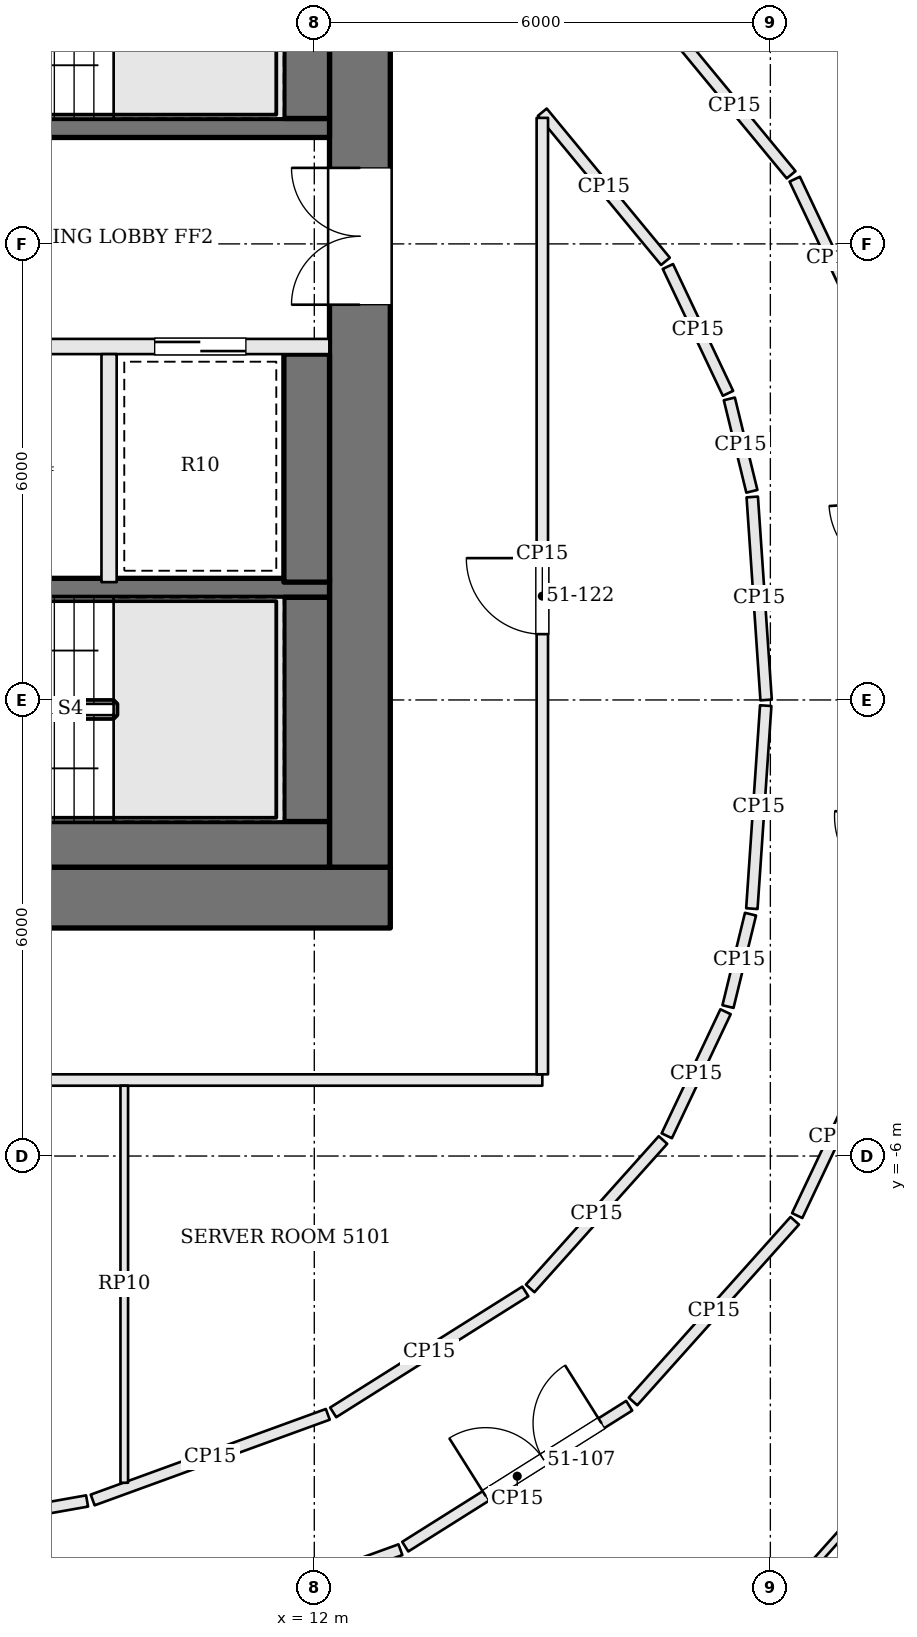
"""IFC4 building model, lengths in metres.
Left out: names, types, materials, properties, quantities, classifications, styles, units other than length and angle.
Written with IfcOpenShell. Run it as: python <this file> out.ifc"""

import sys

from ifc_helpers import new_model, si_unit, direction, frame, frame_2d, origin, place, context, subcontext, project, spatial, rectangle, extrude, element, fill, save


model = new_model("IFC4")
c1 = context("Model", 3, precision=1e-05, world=origin(), true_north=direction((0.0, 1.0)))
c2 = subcontext(c1, "Body", "Model", "MODEL_VIEW")
j1 = project(units=[si_unit("LENGTHUNIT", "METRE"), si_unit("PLANEANGLEUNIT", "RADIAN")], contexts=[c1])
p1 = place(None, origin())
s1 = spatial("IfcSite", under=j1, at=p1, CompositionType="ELEMENT")
p2 = place(p1, origin())
s2 = spatial("IfcBuilding", under=s1, at=p2, CompositionType="ELEMENT")
p3 = place(p2, frame((0.0, 0.0, 209.1)))
s3 = spatial("IfcBuildingStorey", under=s2, at=p3, CompositionType="ELEMENT", Elevation=209.1)
p4 = place(p3, frame((-13.0, -2.6, 0.0), z_axis=(0.0, 0.0, 1.0), x_axis=(1.0, 0.0, 0.0)))
e1 = element("IfcWall", 1, at=p4, inside=s3, PredefinedType="SHEAR", context=c2, shape_type="SweptSolid", body=[
    extrude(rectangle(XDim=26.0, YDim=0.8, at=frame_2d((13.0, 0.0))), origin(), (0.0, 0.0, 1.0), 3.9),
])
p5 = place(p4, frame((9.275, 0.0, 0.0)))
e2 = element("IfcOpeningElement", 2, at=p5, cuts=e1, PredefinedType="OPENING", context=c2, shape_type="SweptSolid", body=[
    extrude(rectangle(XDim=0.9, YDim=2.1, at=frame_2d((0.45, 1.05))), frame((0.0, 0.41, 0.0), z_axis=(0.0, -1.0, 0.0), x_axis=(1.0, 0.0, 0.0)), (0.0, 0.0, 1.0), 0.82),
])
p6 = place(p4, frame((11.75, 0.0, 0.0)))
e3 = element("IfcOpeningElement", 3, at=p6, cuts=e1, PredefinedType="OPENING", context=c2, shape_type="SweptSolid", body=[
    extrude(rectangle(XDim=1.0, YDim=2.1, at=frame_2d((0.5, 1.05))), frame((0.0, 0.41, 0.0), z_axis=(0.0, -1.0, 0.0), x_axis=(1.0, 0.0, 0.0)), (0.0, 0.0, 1.0), 0.82),
])
p7 = place(p4, frame((14.325, 0.0, 0.0)))
e4 = element("IfcOpeningElement", 4, at=p7, cuts=e1, PredefinedType="OPENING", context=c2, shape_type="SweptSolid", body=[
    extrude(rectangle(XDim=0.9, YDim=2.1, at=frame_2d((0.45, 1.05))), frame((0.0, 0.41, 0.0), z_axis=(0.0, -1.0, 0.0), x_axis=(1.0, 0.0, 0.0)), (0.0, 0.0, 1.0), 0.82),
])
p8 = place(p4, frame((16.7, 0.0, 0.0)))
e5 = element("IfcOpeningElement", 5, at=p8, cuts=e1, PredefinedType="OPENING", context=c2, shape_type="SweptSolid", body=[
    extrude(rectangle(XDim=0.9, YDim=2.1, at=frame_2d((0.45, 1.05))), frame((0.0, 0.41, 0.0), z_axis=(0.0, -1.0, 0.0), x_axis=(1.0, 0.0, 0.0)), (0.0, 0.0, 1.0), 0.82),
])
p9 = place(p3, frame((12.6, -2.2, 0.0), z_axis=(0.0, 0.0, 1.0), x_axis=(0.0, 1.0, 0.0)))
e6 = element("IfcWall", 6, at=p9, inside=s3, PredefinedType="SHEAR", context=c2, shape_type="SweptSolid", body=[
    extrude(rectangle(XDim=13.4, YDim=0.8, at=frame_2d((6.7, 0.0))), origin(), (0.0, 0.0, 1.0), 3.9),
])
p10 = place(p9, frame((7.4, 0.0, 0.0)))
e7 = element("IfcOpeningElement", 7, at=p10, cuts=e6, PredefinedType="OPENING", context=c2, shape_type="SweptSolid", body=[
    extrude(rectangle(XDim=1.8, YDim=2.1, at=frame_2d((0.9, 1.05))), frame((0.0, 0.41, 0.0), z_axis=(0.0, -1.0, 0.0), x_axis=(1.0, 0.0, 0.0)), (0.0, 0.0, 1.0), 0.82),
])
p11 = place(p3, frame((12.2, 7.525, 0.0), z_axis=(0.0, 0.0, 1.0), x_axis=(-1.0, 0.0, 0.0)))
e8 = element("IfcWall", 8, at=p11, inside=s3, PredefinedType="SOLIDWALL", context=c2, shape_type="SweptSolid", body=[
    extrude(rectangle(XDim=7.1, YDim=0.25, at=frame_2d((3.55, 0.0))), origin(), (0.0, 0.0, 1.0), 3.7),
])
p12 = place(p11, frame((5.8, 0.0, 0.0)))
e9 = element("IfcOpeningElement", 9, at=p12, cuts=e8, PredefinedType="OPENING", context=c2, shape_type="SweptSolid", body=[
    extrude(rectangle(XDim=1.2, YDim=2.1, at=frame_2d((0.6, 1.05))), frame((0.0, 0.135, 0.0), z_axis=(0.0, -1.0, 0.0), x_axis=(1.0, 0.0, 0.0)), (0.0, 0.0, 1.0), 0.27),
])
p13 = place(p3, frame((12.2, 4.65, 0.0), z_axis=(0.0, 0.0, 1.0), x_axis=(-1.0, 0.0, 0.0)))
e10 = element("IfcWall", 10, at=p13, inside=s3, PredefinedType="SOLIDWALL", context=c2, shape_type="SweptSolid", body=[
    extrude(rectangle(XDim=7.1, YDim=0.2, at=frame_2d((3.55, 0.0))), origin(), (0.0, 0.0, 1.0), 3.7),
])
p14 = place(p13, frame((4.4, 0.0, 0.0)))
e11 = element("IfcOpeningElement", 11, at=p14, cuts=e10, PredefinedType="OPENING", context=c2, shape_type="SweptSolid", body=[
    extrude(rectangle(XDim=1.2, YDim=2.1, at=frame_2d((0.6, 1.05))), frame((0.0, 0.11, 0.0), z_axis=(0.0, -1.0, 0.0), x_axis=(1.0, 0.0, 0.0)), (0.0, 0.0, 1.0), 0.22),
])
p15 = place(p13, frame((1.1, 0.0, 0.0)))
e12 = element("IfcOpeningElement", 12, at=p15, cuts=e10, PredefinedType="OPENING", context=c2, shape_type="SweptSolid", body=[
    extrude(rectangle(XDim=1.2, YDim=2.1, at=frame_2d((0.6, 1.05))), frame((0.0, 0.11, 0.0), z_axis=(0.0, -1.0, 0.0), x_axis=(1.0, 0.0, 0.0)), (0.0, 0.0, 1.0), 0.22),
])
p16 = place(p3, frame((12.2, 1.475, 0.0), z_axis=(0.0, 0.0, 1.0), x_axis=(-1.0, 0.0, 0.0)))
e13 = element("IfcWall", 13, at=p16, inside=s3, PredefinedType="SOLIDWALL", context=c2, shape_type="SweptSolid", body=[
    extrude(rectangle(XDim=7.1, YDim=0.25, at=frame_2d((3.55, 0.0))), origin(), (0.0, 0.0, 1.0), 3.7),
])
p17 = place(p16, frame((5.8, 0.0, 0.0)))
e14 = element("IfcOpeningElement", 14, at=p17, cuts=e13, PredefinedType="OPENING", context=c2, shape_type="SweptSolid", body=[
    extrude(rectangle(XDim=1.2, YDim=2.1, at=frame_2d((0.6, 1.05))), frame((0.0, 0.135, 0.0), z_axis=(0.0, -1.0, 0.0), x_axis=(1.0, 0.0, 0.0)), (0.0, 0.0, 1.0), 0.27),
])
p18 = place(p3, frame((9.3, 4.55, 0.0), z_axis=(0.0, 0.0, 1.0), x_axis=(0.0, -1.0, 0.0)))
e15 = element("IfcWall", 15, at=p18, inside=s3, PredefinedType="SOLIDWALL", context=c2, shape_type="SweptSolid", body=[
    extrude(rectangle(XDim=3.0, YDim=0.2, at=frame_2d((1.5, 0.0))), origin(), (0.0, 0.0, 1.0), 3.7),
])
p19 = place(p3, frame((11.9, 10.6, 0.0), z_axis=(0.0, 0.0, 1.0), x_axis=(0.0, -1.0, 0.0)))
e16 = element("IfcWall", 16, at=p19, inside=s3, PredefinedType="SOLIDWALL", context=c2, shape_type="SweptSolid", body=[
    extrude(rectangle(XDim=2.95, YDim=0.6, at=frame_2d((1.475, 0.0))), origin(), (0.0, 0.0, 1.0), 3.7),
])
p20 = place(p3, frame((11.9, 4.55, 0.0), z_axis=(0.0, 0.0, 1.0), x_axis=(0.0, -1.0, 0.0)))
e17 = element("IfcWall", 17, at=p20, inside=s3, PredefinedType="SOLIDWALL", context=c2, shape_type="SweptSolid", body=[
    extrude(rectangle(XDim=3.0, YDim=0.6, at=frame_2d((1.5, 0.0))), origin(), (0.0, 0.0, 1.0), 3.7),
])
p21 = place(p3, frame((11.9, 1.35, 0.0), z_axis=(0.0, 0.0, 1.0), x_axis=(0.0, -1.0, 0.0)))
e18 = element("IfcWall", 18, at=p21, inside=s3, PredefinedType="SOLIDWALL", context=c2, shape_type="SweptSolid", body=[
    extrude(rectangle(XDim=2.95, YDim=0.6, at=frame_2d((1.475, 0.0))), origin(), (0.0, 0.0, 1.0), 3.7),
])
p22 = place(p3, frame((12.2, -1.9, 0.0), z_axis=(0.0, 0.0, 1.0), x_axis=(-1.0, 0.0, 0.0)))
e19 = element("IfcWall", 19, at=p22, inside=s3, PredefinedType="SOLIDWALL", context=c2, shape_type="SweptSolid", body=[
    extrude(rectangle(XDim=7.1, YDim=0.6, at=frame_2d((3.55, 0.0))), origin(), (0.0, 0.0, 1.0), 3.7),
])
p23 = place(p3, frame((11.767, -11.676, 0.0), z_axis=(0.0, 0.0, 1.0), x_axis=(0.939641296478, 0.342161122797, 0.0)))
e20 = element("IfcWall", 20, at=p23, inside=s3, PredefinedType="PARTITIONING", context=c2, shape_type="SweptSolid", body=[
    extrude(rectangle(XDim=1.453, YDim=0.15, at=frame_2d((0.727, 0.0))), origin(), (0.0, 0.0, 1.0), 3.084),
])
p24 = place(p3, frame((13.197, -11.139, 0.0), z_axis=(0.0, 0.0, 1.0), x_axis=(0.846390903833, 0.532562144644, 0.0)))
e21 = element("IfcWall", 21, at=p24, inside=s3, PredefinedType="PARTITIONING", context=c2, shape_type="SweptSolid", body=[
    extrude(rectangle(XDim=3.481, YDim=0.15, at=frame_2d((1.741, 0.0))), origin(), (0.0, 0.0, 1.0), 3.084),
])
p25 = place(p24, frame((1.25, 0.0, 0.0)))
e22 = element("IfcOpeningElement", 22, at=p25, cuts=e21, PredefinedType="OPENING", context=c2, shape_type="SweptSolid", body=[
    extrude(rectangle(XDim=1.8, YDim=2.1, at=frame_2d((0.9, 1.05))), frame((0.0, 0.085, 0.0), z_axis=(0.0, -1.0, 0.0), x_axis=(1.0, 0.0, 0.0)), (0.0, 0.0, 1.0), 0.17),
])
p26 = place(p3, frame((16.193, -9.229, 0.0), z_axis=(0.0, 0.0, 1.0), x_axis=(0.666882089048, 0.745163256815, 0.0)))
e23 = element("IfcWall", 23, at=p26, inside=s3, PredefinedType="PARTITIONING", context=c2, shape_type="SweptSolid", body=[
    extrude(rectangle(XDim=3.19, YDim=0.15, at=frame_2d((1.595, 0.0))), origin(), (0.0, 0.0, 1.0), 3.084),
])
for number, where, z_axis, x_axis in (
    (24, (18.353, -6.784, 0.0), (0.0, 0.0, 1.0), (0.428, 0.904, 0.0)),
    (25, (19.305, 4.773, 0.0), (0.0, 0.0, 1.0), (-0.428, 0.904, 0.0)),
):
    element("IfcWall", number, at=place(p3, frame(where, z_axis=z_axis, x_axis=x_axis)), inside=s3, PredefinedType="PARTITIONING", context=c2, shape_type="SweptSolid", body=[
        extrude(rectangle(XDim=2.3, YDim=0.15, at=frame_2d((1.15, 0.0))), origin(), (0.0, 0.0, 1.0), 3.084),
    ])
p27 = place(p3, frame((18.273, 6.909, 0.0), z_axis=(0.0, 0.0, 1.0), x_axis=(-0.63653648943, 0.771246586783, 0.0)))
e26 = element("IfcWall", 26, at=p27, inside=s3, PredefinedType="PARTITIONING", context=c2, shape_type="SweptSolid", body=[
    extrude(rectangle(XDim=2.342, YDim=0.15, at=frame_2d((1.171, 0.0))), origin(), (0.0, 0.0, 1.0), 3.084),
])
p28 = place(p3, frame((15.0, 7.733, 0.0), z_axis=(0.0, 0.0, 1.0), x_axis=(0.636601263488, -0.771193121938, 0.0)))
e27 = element("IfcWall", 27, at=p28, inside=s3, PredefinedType="PARTITIONING", context=c2, shape_type="SweptSolid", body=[
    extrude(rectangle(XDim=2.545, YDim=0.15, at=frame_2d((1.272, 0.0))), origin(), (0.0, 0.0, 1.0), 3.084),
])
p29 = place(p3, frame((16.652, 5.702, 0.0), z_axis=(0.0, 0.0, 1.0), x_axis=(0.428126129773, -0.903718992279, 0.0)))
e28 = element("IfcWall", 28, at=p29, inside=s3, PredefinedType="PARTITIONING", context=c2, shape_type="SweptSolid", body=[
    extrude(rectangle(XDim=1.846, YDim=0.15, at=frame_2d((0.923, 0.0))), origin(), (0.0, 0.0, 1.0), 3.084),
])
p30 = place(p3, frame((17.46, 3.961, 0.0), z_axis=(0.0, 0.0, 1.0), x_axis=(0.236655249498, -0.971593687137, 0.0)))
e29 = element("IfcWall", 29, at=p30, inside=s3, PredefinedType="PARTITIONING", context=c2, shape_type="SweptSolid", body=[
    extrude(rectangle(XDim=1.251, YDim=0.15, at=frame_2d((0.626, 0.0))), origin(), (0.0, 0.0, 1.0), 3.084),
])
p31 = place(p3, frame((17.762, 2.67, 0.0), z_axis=(0.0, 0.0, 1.0), x_axis=(0.068135311644, -0.997676089373, 0.0)))
e30 = element("IfcWall", 30, at=p31, inside=s3, PredefinedType="PARTITIONING", context=c2, shape_type="SweptSolid", body=[
    extrude(rectangle(XDim=2.677, YDim=0.15, at=frame_2d((1.338, 0.0))), origin(), (0.0, 0.0, 1.0), 3.084),
])
p32 = place(p3, frame((17.939, -0.075, 0.0), z_axis=(0.0, 0.0, 1.0), x_axis=(-0.068226099283, -0.99766988497, 0.0)))
e31 = element("IfcWall", 31, at=p32, inside=s3, PredefinedType="PARTITIONING", context=c2, shape_type="SweptSolid", body=[
    extrude(rectangle(XDim=2.677, YDim=0.15, at=frame_2d((1.338, 0.0))), origin(), (0.0, 0.0, 1.0), 3.084),
])
p33 = place(p3, frame((17.739, -2.818, 0.0), z_axis=(0.0, 0.0, 1.0), x_axis=(-0.236884307907, -0.971537865792, 0.0)))
e32 = element("IfcWall", 32, at=p33, inside=s3, PredefinedType="PARTITIONING", context=c2, shape_type="SweptSolid", body=[
    extrude(rectangle(XDim=1.251, YDim=0.15, at=frame_2d((0.625, 0.0))), origin(), (0.0, 0.0, 1.0), 3.084),
])
p34 = place(p3, frame((17.41, -4.102, 0.0), z_axis=(0.0, 0.0, 1.0), x_axis=(-0.428074720318, -0.903743345107, 0.0)))
e33 = element("IfcWall", 33, at=p34, inside=s3, PredefinedType="PARTITIONING", context=c2, shape_type="SweptSolid", body=[
    extrude(rectangle(XDim=1.806, YDim=0.15, at=frame_2d((0.903, 0.0))), origin(), (0.0, 0.0, 1.0), 3.084),
])
p35 = place(p3, frame((16.587, -5.789, 0.0), z_axis=(0.0, 0.0, 1.0), x_axis=(-0.666887460656, -0.745158449472, 0.0)))
e34 = element("IfcWall", 34, at=p35, inside=s3, PredefinedType="PARTITIONING", context=c2, shape_type="SweptSolid", body=[
    extrude(rectangle(XDim=2.62, YDim=0.15, at=frame_2d((1.31, 0.0))), origin(), (0.0, 0.0, 1.0), 3.084),
])
p36 = place(p3, frame((14.777, -7.781, 0.0), z_axis=(0.0, 0.0, 1.0), x_axis=(-0.846359741043, -0.532611667862, 0.0)))
e35 = element("IfcWall", 35, at=p36, inside=s3, PredefinedType="PARTITIONING", context=c2, shape_type="SweptSolid", body=[
    extrude(rectangle(XDim=2.987, YDim=0.15, at=frame_2d((1.494, 0.0))), origin(), (0.0, 0.0, 1.0), 3.084),
])
p37 = place(p3, frame((12.178, -9.398, 0.0), z_axis=(0.0, 0.0, 1.0), x_axis=(-0.939609240084, -0.342249143093, 0.0)))
e36 = element("IfcWall", 36, at=p37, inside=s3, PredefinedType="PARTITIONING", context=c2, shape_type="SweptSolid", body=[
    extrude(rectangle(XDim=3.292, YDim=0.15, at=frame_2d((1.646, 0.0))), origin(), (0.0, 0.0, 1.0), 3.084),
])
p38 = place(p3, frame((9.01, -10.538, 0.0), z_axis=(0.0, 0.0, 1.0), x_axis=(-0.984645638575, -0.174565077936, 0.0)))
e37 = element("IfcWall", 37, at=p38, inside=s3, PredefinedType="PARTITIONING", context=c2, shape_type="SweptSolid", body=[
    extrude(rectangle(XDim=4.358, YDim=0.15, at=frame_2d((2.179, 0.0))), origin(), (0.0, 0.0, 1.0), 3.084),
])
p39 = place(p3, frame((-14.925, -5.0, 0.0), z_axis=(0.0, 0.0, 1.0), x_axis=(1.0, 0.0, 0.0)))
e38 = element("IfcWall", 38, at=p39, inside=s3, PredefinedType="PARTITIONING", context=c2, shape_type="SweptSolid", body=[
    extrude(rectangle(XDim=29.925, YDim=0.15, at=frame_2d((14.962, 0.0))), origin(), (0.0, 0.0, 1.0), 3.084),
])
p40 = place(p39, frame((14.025, 0.0, 0.0)))
e39 = element("IfcOpeningElement", 39, at=p40, cuts=e38, PredefinedType="OPENING", context=c2, shape_type="SweptSolid", body=[
    extrude(rectangle(XDim=1.8, YDim=2.1, at=frame_2d((0.9, 1.05))), frame((0.0, 0.085, 0.0), z_axis=(0.0, -1.0, 0.0), x_axis=(1.0, 0.0, 0.0)), (0.0, 0.0, 1.0), 0.17),
])
p41 = place(p3, frame((15.0, -4.925, 0.0), z_axis=(0.0, 0.0, 1.0), x_axis=(0.0, 1.0, 0.0)))
e40 = element("IfcWall", 40, at=p41, inside=s3, PredefinedType="PARTITIONING", context=c2, shape_type="SweptSolid", body=[
    extrude(rectangle(XDim=12.583, YDim=0.15, at=frame_2d((6.292, 0.0))), origin(), (0.0, 0.0, 1.0), 3.084),
])
p42 = place(p41, frame((5.791, 0.0, 0.0)))
e41 = element("IfcOpeningElement", 41, at=p42, cuts=e40, PredefinedType="OPENING", context=c2, shape_type="SweptSolid", body=[
    extrude(rectangle(XDim=1.0, YDim=2.1, at=frame_2d((0.5, 1.05))), frame((0.0, 0.085, 0.0), z_axis=(0.0, -1.0, 0.0), x_axis=(1.0, 0.0, 0.0)), (0.0, 0.0, 1.0), 0.17),
])
p43 = place(p3, frame((20.981, -8.677, 0.0), z_axis=(0.0, 0.0, 1.0), x_axis=(-0.666907205473, -0.745140778167, 0.0)))
e42 = element("IfcWall", 42, at=p43, inside=s3, PredefinedType="PARTITIONING", context=c2, shape_type="SweptSolid", body=[
    extrude(rectangle(XDim=4.129, YDim=0.1, at=frame_2d((2.064, 0.0))), origin(), (0.0, 0.0, 1.0), 3.084),
])
p44 = place(p3, frame((9.5, -10.299, 0.0), z_axis=(0.0, 0.0, 1.0), x_axis=(0.0, 1.0, 0.0)))
e43 = element("IfcWall", 43, at=p44, inside=s3, PredefinedType="PARTITIONING", context=c2, shape_type="SweptSolid", body=[
    extrude(rectangle(XDim=5.224, YDim=0.1, at=frame_2d((2.612, 0.0))), origin(), (0.0, 0.0, 1.0), 3.084),
])
p45 = place(p10, origin())
e44 = element("IfcDoor", 44, at=p45, inside=s3, OperationType="DOUBLE_DOOR_SINGLE_SWING", PredefinedType="DOOR", context=c2, shape_type="SweptSolid", body=[
    extrude(rectangle(XDim=1.8, YDim=2.1, at=frame_2d((0.9, 1.05))), frame((0.0, 0.025, 0.0), z_axis=(0.0, -1.0, 0.0), x_axis=(1.0, 0.0, 0.0)), (0.0, 0.0, 1.0), 0.05),
])
fill(e7, e44)
p46 = place(p15, origin())
e45 = element("IfcDoor", 45, at=p46, inside=s3, OperationType="SLIDING_TO_RIGHT", PredefinedType="DOOR", context=c2, shape_type="SweptSolid", body=[
    extrude(rectangle(XDim=1.2, YDim=2.1, at=frame_2d((0.6, 1.05))), frame((0.0, 0.025, 0.0), z_axis=(0.0, -1.0, 0.0), x_axis=(1.0, 0.0, 0.0)), (0.0, 0.0, 1.0), 0.05),
])
fill(e12, e45)
p47 = place(p25, origin())
e46 = element("IfcDoor", 46, at=p47, inside=s3, OperationType="DOUBLE_DOOR_SINGLE_SWING", PredefinedType="DOOR", context=c2, shape_type="SweptSolid", body=[
    extrude(rectangle(XDim=1.8, YDim=2.1, at=frame_2d((0.9, 1.05))), frame((0.0, 0.025, 0.0), z_axis=(0.0, -1.0, 0.0), x_axis=(1.0, 0.0, 0.0)), (0.0, 0.0, 1.0), 0.05),
])
fill(e22, e46)
p48 = place(p42, origin())
e47 = element("IfcDoor", 47, at=p48, inside=s3, OperationType="SINGLE_SWING_RIGHT", PredefinedType="DOOR", context=c2, shape_type="SweptSolid", body=[
    extrude(rectangle(XDim=1.0, YDim=2.1, at=frame_2d((0.5, 1.05))), frame((0.0, 0.025, 0.0), z_axis=(0.0, -1.0, 0.0), x_axis=(1.0, 0.0, 0.0)), (0.0, 0.0, 1.0), 0.05),
])
fill(e41, e47)
save(model, sys.argv[1])
